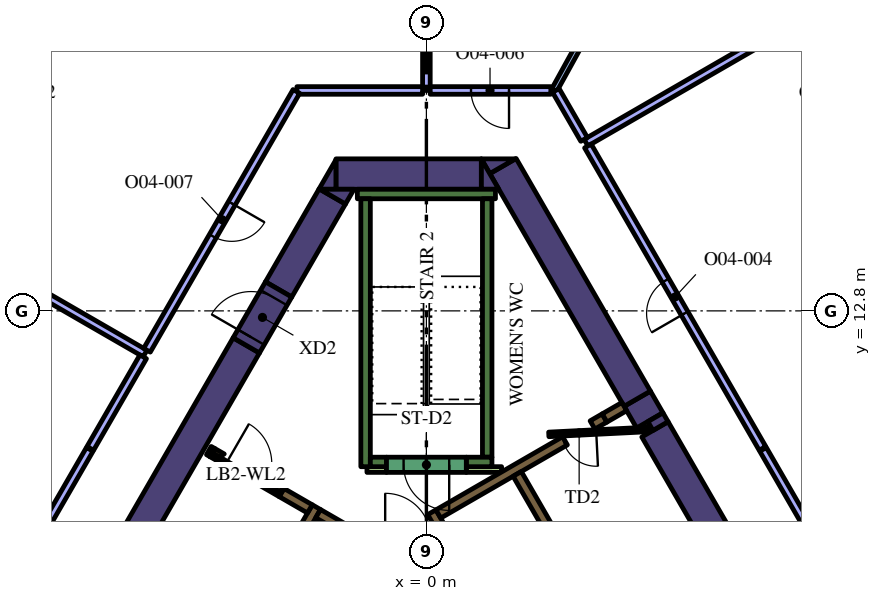
"""IFC4 building model, lengths in metres.
Left out: names, types, materials, properties, quantities, classifications, styles, units other than length and angle.
Written with IfcOpenShell. Run it as: python <this file> out.ifc"""

import sys

from ifc_helpers import new_model, si_unit, direction, frame, frame_2d, origin, place, context, subcontext, project, spatial, polyline, rectangle, outline, extrude, element, fill, save


model = new_model("IFC4")
c1 = context("Model", 3, precision=1e-05, world=origin(), true_north=direction((0.0, 1.0)))
c2 = subcontext(c1, "Body", "Model", "MODEL_VIEW")
j1 = project(units=[si_unit("LENGTHUNIT", "METRE"), si_unit("PLANEANGLEUNIT", "RADIAN")], contexts=[c1])
p1 = place(None, origin())
s1 = spatial("IfcSite", under=j1, at=p1, CompositionType="ELEMENT")
p2 = place(p1, origin())
s2 = spatial("IfcBuilding", under=s1, at=p2, CompositionType="ELEMENT")
p3 = place(p2, frame((0.0, 0.0, 183.6)))
s3 = spatial("IfcBuildingStorey", under=s2, at=p3, CompositionType="ELEMENT", Elevation=183.6)
p4 = place(p3, frame((5.878, 9.918, 0.0), z_axis=(0.0, 0.0, 1.0), x_axis=(-0.499893918903, 0.866086641072, 0.0)))
e1 = element("IfcWall", 1, at=p4, inside=s3, PredefinedType="SOLIDWALL", context=c2, shape_type="SweptSolid", body=[
    extrude(rectangle(XDim=0.657, YDim=0.8, at=frame_2d((0.329, 0.0))), origin(), (0.0, 0.0, 1.0), 4.2),
])
p5 = place(p3, frame((8.279, 5.761, 0.0), z_axis=(0.0, 0.0, 1.0), x_axis=(-0.500024261398, 0.866011396007, 0.0)))
e2 = element("IfcWall", 2, at=p5, inside=s3, PredefinedType="SOLIDWALL", context=c2, shape_type="SweptSolid", body=[
    extrude(rectangle(XDim=4.528, YDim=0.8, at=frame_2d((2.264, 0.0))), origin(), (0.0, 0.0, 1.0), 4.2),
])
p6 = place(p3, origin())
e3 = element("IfcWall", 3, at=p6, inside=s3, PredefinedType="SOLIDWALL", context=c2, shape_type="SweptSolid", body=[
    extrude(outline(polyline([(5.961, 9.654), (5.827, 9.886), (6.226, 10.116), (6.36, 9.884), (5.961, 9.654)])), origin(), (0.0, 0.0, 1.0), 4.2),
])
p7 = place(p3, frame((5.549, 10.489, 0.0), z_axis=(0.0, 0.0, 1.0), x_axis=(-0.50001746176, 0.866015321998, 0.0)))
e4 = element("IfcWall", 4, at=p7, inside=s3, PredefinedType="SOLIDWALL", context=c2, shape_type="SweptSolid", body=[
    extrude(rectangle(XDim=7.068, YDim=0.8, at=frame_2d((3.534, 0.0))), origin(), (0.0, 0.0, 1.0), 4.2),
])
e5 = element("IfcWall", 5, at=p6, inside=s3, PredefinedType="SOLIDWALL", context=c2, shape_type="SweptSolid", body=[
    extrude(outline(polyline([(1.443, 16.8), (2.339, 16.8), (1.667, 16.412), (1.443, 16.8)])), origin(), (0.0, 0.0, 1.0), 4.2),
])
p8 = place(p3, frame((-2.379, 16.4, 0.0), z_axis=(0.0, 0.0, 1.0), x_axis=(1.0, 0.0, 0.0)))
e6 = element("IfcWall", 6, at=p8, inside=s3, PredefinedType="SOLIDWALL", context=c2, shape_type="SweptSolid", body=[
    extrude(rectangle(XDim=3.824, YDim=0.8, at=frame_2d((1.912, 0.0))), origin(), (0.0, 0.0, 1.0), 4.2),
])
e7 = element("IfcWall", 7, at=p6, inside=s3, PredefinedType="SOLIDWALL", context=c2, shape_type="SweptSolid", body=[
    extrude(outline(polyline([(1.905, 16.0), (1.447, 16.0), (1.447, 16.793), (1.905, 16.0)])), origin(), (0.0, 0.0, 1.0), 4.2),
])
e8 = element("IfcWall", 8, at=p6, inside=s3, PredefinedType="SOLIDWALL", context=c2, shape_type="SweptSolid", body=[
    extrude(outline(polyline([(-2.829, 16.0), (-2.381, 16.776), (-2.381, 16.0), (-2.829, 16.0)])), origin(), (0.0, 0.0, 1.0), 4.2),
])
p9 = place(p3, frame((-2.477, 15.81, 0.0), z_axis=(0.0, 0.0, 1.0), x_axis=(-0.499969377405, -0.866043083026, 0.0)))
e9 = element("IfcWall", 9, at=p9, inside=s3, PredefinedType="SOLIDWALL", context=c2, shape_type="SweptSolid", body=[
    extrude(rectangle(XDim=2.824, YDim=0.8, at=frame_2d((1.412, 0.0))), origin(), (0.0, 0.0, 1.0), 4.2),
])
e10 = element("IfcWall", 10, at=p6, inside=s3, PredefinedType="SOLIDWALL", context=c2, shape_type="SweptSolid", body=[
    extrude(outline(polyline([(-1.905, 16.0), (-2.129, 15.612), (-2.801, 16.0), (-1.905, 16.0)])), origin(), (0.0, 0.0, 1.0), 4.2),
])
p10 = place(p3, frame((-12.668, -1.842, 0.0), z_axis=(0.0, 0.0, 1.0), x_axis=(0.500003640647, 0.866023301845, 0.0)))
e11 = element("IfcWall", 11, at=p10, inside=s3, PredefinedType="SOLIDWALL", context=c2, shape_type="SweptSolid", body=[
    extrude(rectangle(XDim=15.858, YDim=0.8, at=frame_2d((7.929, 0.0))), origin(), (0.0, 0.0, 1.0), 4.2),
])
p11 = place(p3, frame((-1.817, 15.875, 0.0), z_axis=(0.0, 0.0, 1.0), x_axis=(1.0, 0.0, 0.0)))
e12 = element("IfcWall", 12, at=p11, inside=s3, PredefinedType="SOLIDWALL", context=c2, shape_type="SweptSolid", body=[
    extrude(rectangle(XDim=3.634, YDim=0.25, at=frame_2d((1.817, 0.0))), origin(), (0.0, 0.0, 1.0), 4.2),
])
p12 = place(p3, frame((1.6, 8.95, 0.0), z_axis=(0.0, 0.0, 1.0), x_axis=(0.0, 1.0, 0.0)))
e13 = element("IfcWall", 13, at=p12, inside=s3, PredefinedType="SOLIDWALL", context=c2, shape_type="SweptSolid", body=[
    extrude(rectangle(XDim=6.8, YDim=0.25, at=frame_2d((3.4, 0.0))), origin(), (0.0, 0.0, 1.0), 4.2),
])
p13 = place(p3, frame((1.05, 8.825, 0.0), z_axis=(0.0, 0.0, 1.0), x_axis=(1.0, 0.0, 0.0)))
e14 = element("IfcWall", 14, at=p13, inside=s3, PredefinedType="SOLIDWALL", context=c2, shape_type="SweptSolid", body=[
    extrude(rectangle(XDim=0.675, YDim=0.25, at=frame_2d((0.337, 0.0))), origin(), (0.0, 0.0, 1.0), 4.2),
])
p14 = place(p3, frame((-1.6, 8.7, 0.0), z_axis=(0.0, 0.0, 1.0), x_axis=(0.0, 1.0, 0.0)))
e15 = element("IfcWall", 15, at=p14, inside=s3, PredefinedType="SOLIDWALL", context=c2, shape_type="SweptSolid", body=[
    extrude(rectangle(XDim=7.05, YDim=0.25, at=frame_2d((3.525, 0.0))), origin(), (0.0, 0.0, 1.0), 4.2),
])
p15 = place(p3, frame((-1.475, 8.825, 0.0), z_axis=(0.0, 0.0, 1.0), x_axis=(1.0, 0.0, 0.0)))
e16 = element("IfcWall", 16, at=p15, inside=s3, PredefinedType="SOLIDWALL", context=c2, shape_type="SweptSolid", body=[
    extrude(rectangle(XDim=0.425, YDim=0.25, at=frame_2d((0.212, 0.0))), origin(), (0.0, 0.0, 1.0), 4.2),
])
p16 = place(p3, frame((0.417, 7.027, 0.0), z_axis=(0.0, 0.0, 1.0), x_axis=(-0.500210807569, 0.865903659763, 0.0)))
e17 = element("IfcWall", 17, at=p16, inside=s3, PredefinedType="SOLIDWALL", context=c2, shape_type="SweptSolid", body=[
    extrude(rectangle(XDim=0.548, YDim=0.25, at=frame_2d((0.274, 0.0))), origin(), (0.0, 0.0, 1.0), 4.2),
])
p17 = place(p3, frame((3.647, 9.38, 0.0), z_axis=(0.0, 0.0, 1.0), x_axis=(-0.866025015791, -0.500000672024, 0.0)))
e18 = element("IfcWall", 18, at=p17, inside=s3, PredefinedType="SOLIDWALL", context=c2, shape_type="SweptSolid", body=[
    extrude(rectangle(XDim=3.849, YDim=0.25, at=frame_2d((1.924, 0.0))), origin(), (0.0, 0.0, 1.0), 4.2),
])
p18 = place(p3, frame((4.688, 9.981, 0.0), z_axis=(0.0, 0.0, 1.0), x_axis=(-0.865974312977, -0.500088481434, 0.0)))
e19 = element("IfcWall", 19, at=p18, inside=s3, PredefinedType="SOLIDWALL", context=c2, shape_type="SweptSolid", body=[
    extrude(rectangle(XDim=0.366, YDim=0.25, at=frame_2d((0.183, 0.0))), origin(), (0.0, 0.0, 1.0), 4.2),
])
p19 = place(p3, frame((4.689, 9.982, 0.0), z_axis=(0.0, 0.0, 1.0), x_axis=(0.865947592822, 0.500134748329, 0.0)))
e20 = element("IfcWall", 20, at=p19, inside=s3, PredefinedType="SOLIDWALL", context=c2, shape_type="SweptSolid", body=[
    extrude(rectangle(XDim=0.598, YDim=0.25, at=frame_2d((0.299, 0.0))), origin(), (0.0, 0.0, 1.0), 4.2),
])
p20 = place(p3, frame((-8.06, -1.311, 0.0), z_axis=(0.0, 0.0, 1.0), x_axis=(0.50000273126, 0.866023826885, 0.0)))
e21 = element("IfcWall", 21, at=p20, inside=s3, PredefinedType="SOLIDWALL", context=c2, shape_type="SweptSolid", body=[
    extrude(rectangle(XDim=10.33, YDim=0.25, at=frame_2d((5.165, 0.0))), origin(), (0.0, 0.0, 1.0), 4.2),
])
p21 = place(p3, frame((-1.76, 6.836, 0.0), z_axis=(0.0, 0.0, 1.0), x_axis=(-0.865952863304, 0.500125622755, 0.0)))
e22 = element("IfcWall", 22, at=p21, inside=s3, PredefinedType="SOLIDWALL", context=c2, shape_type="SweptSolid", body=[
    extrude(rectangle(XDim=1.258, YDim=0.25, at=frame_2d((0.629, 0.0))), origin(), (0.0, 0.0, 1.0), 4.2),
])
p22 = place(p3, frame((-5.725, 9.125, 0.0), z_axis=(0.0, 0.0, 1.0), x_axis=(0.866185586049, -0.49972245349, 0.0)))
e23 = element("IfcWall", 23, at=p22, inside=s3, PredefinedType="SOLIDWALL", context=c2, shape_type="SweptSolid", body=[
    extrude(rectangle(XDim=0.11, YDim=0.25, at=frame_2d((0.055, 0.0))), origin(), (0.0, 0.0, 1.0), 4.2),
])
p23 = place(p3, frame((-3.066, 7.59, 0.0), z_axis=(0.0, 0.0, 1.0), x_axis=(-0.866081358704, 0.49990307071, 0.0)))
e24 = element("IfcWall", 24, at=p23, inside=s3, PredefinedType="SOLIDWALL", context=c2, shape_type="SweptSolid", body=[
    extrude(rectangle(XDim=0.858, YDim=0.25, at=frame_2d((0.429, 0.0))), origin(), (0.0, 0.0, 1.0), 4.2),
])
e25 = element("IfcWall", 25, at=p6, inside=s3, PredefinedType="SOLIDWALL", context=c2, shape_type="SweptSolid", body=[
    extrude(outline(polyline([(-3.748, 8.128), (-3.813, 8.015), (-4.027, 8.139), (-4.017, 8.156), (-4.008, 8.173), (-4.0, 8.192), (-3.995, 8.21), (-3.991, 8.23), (-3.99, 8.25), (-3.99, 8.268), (-3.748, 8.128)])), origin(), (0.0, 0.0, 1.0), 4.2),
])
e26 = element("IfcWall", 26, at=p6, inside=s3, PredefinedType="SOLIDWALL", context=c2, shape_type="SweptSolid", body=[
    extrude(outline(polyline([(-5.689, 8.96), (-5.69, 8.961), (-5.565, 9.177), (-5.319, 9.035), (-5.335, 9.026), (-5.351, 9.015), (-5.366, 9.002), (-5.379, 8.988), (-5.392, 8.972), (-5.402, 8.956), (-5.412, 8.939), (-5.629, 9.064), (-5.629, 9.064), (-5.689, 8.96)])), origin(), (0.0, 0.0, 1.0), 4.2),
])
p24 = place(p3, frame((1.05, 8.625, 0.0), z_axis=(0.0, 0.0, 1.0), x_axis=(1.0, 0.0, 0.0)))
e27 = element("IfcWall", 27, at=p24, inside=s3, PredefinedType="PARTITIONING", context=c2, shape_type="SweptSolid", body=[
    extrude(rectangle(XDim=0.929, YDim=0.15, at=frame_2d((0.464, 0.0))), origin(), (0.0, 0.0, 1.0), 3.15),
])
p25 = place(p3, frame((-1.564, 8.625, 0.0), z_axis=(0.0, 0.0, 1.0), x_axis=(1.0, 0.0, 0.0)))
e28 = element("IfcWall", 28, at=p25, inside=s3, PredefinedType="PARTITIONING", context=c2, shape_type="SweptSolid", body=[
    extrude(rectangle(XDim=0.514, YDim=0.15, at=frame_2d((0.257, 0.0))), origin(), (0.0, 0.0, 1.0), 3.15),
])
p26 = place(p3, frame((8.565, -2.185, 0.0), z_axis=(0.0, 0.0, 1.0), x_axis=(-0.499997954832, 0.866026584559, 0.0)))
e29 = element("IfcWall", 29, at=p26, inside=s3, PredefinedType="SOLIDWALL", context=c2, shape_type="SweptSolid", body=[
    extrude(rectangle(XDim=12.35, YDim=0.25, at=frame_2d((6.175, 0.0))), origin(), (0.0, 0.0, 1.0), 4.2),
])
p27 = place(p26, frame((0.585, 0.0, 0.0)))
e30 = element("IfcOpeningElement", 30, at=p27, cuts=e29, PredefinedType="OPENING", context=c2, shape_type="SweptSolid", body=[
    extrude(rectangle(XDim=1.1, YDim=2.1, at=frame_2d((0.55, 1.05))), frame((0.0, 0.135, 0.0), z_axis=(0.0, -1.0, 0.0), x_axis=(1.0, 0.0, 0.0)), (0.0, 0.0, 1.0), 0.27),
])
p28 = place(p3, frame((1.05, 8.75, 0.0), z_axis=(0.0, 0.0, 1.0), x_axis=(-1.0, 0.0, 0.0)))
e31 = element("IfcWall", 31, at=p28, inside=s3, PredefinedType="SOLIDWALL", context=c2, shape_type="SweptSolid", body=[
    extrude(rectangle(XDim=2.1, YDim=0.4, at=frame_2d((1.05, 0.0))), origin(), (0.0, 0.0, 1.0), 4.2),
])
p29 = place(p28, frame((0.45, 0.0, 0.0)))
e32 = element("IfcOpeningElement", 32, at=p29, cuts=e31, PredefinedType="OPENING", context=c2, shape_type="SweptSolid", body=[
    extrude(rectangle(XDim=1.2, YDim=2.1, at=frame_2d((0.6, 1.05))), frame((0.0, 0.21, 0.0), z_axis=(0.0, -1.0, 0.0), x_axis=(1.0, 0.0, 0.0)), (0.0, 0.0, 1.0), 0.42),
])
p30 = place(p3, frame((5.917, 9.684, 0.0), z_axis=(0.0, 0.0, 1.0), x_axis=(-0.998758194515, -0.049820366212, 0.0)))
e33 = element("IfcWall", 33, at=p30, inside=s3, PredefinedType="PARTITIONING", context=c2, shape_type="SweptSolid", body=[
    extrude(rectangle(XDim=2.7, YDim=0.12, at=frame_2d((1.35, 0.0))), origin(), (0.0, 0.0, 1.0), 3.15),
])
p31 = place(p30, frame((1.45, 0.0, 0.0)))
e34 = element("IfcOpeningElement", 34, at=p31, cuts=e33, PredefinedType="OPENING", context=c2, shape_type="SweptSolid", body=[
    extrude(rectangle(XDim=0.9, YDim=2.1, at=frame_2d((0.45, 1.05))), frame((0.0, 0.07, 0.0), z_axis=(0.0, -1.0, 0.0), x_axis=(1.0, 0.0, 0.0)), (0.0, 0.0, 1.0), 0.14),
])
p32 = place(p3, frame((-5.659, 9.012, 0.0), z_axis=(0.0, 0.0, 1.0), x_axis=(0.866009402589, -0.500027713859, 0.0)))
e35 = element("IfcWall", 35, at=p32, inside=s3, PredefinedType="PARTITIONING", context=c2, shape_type="SweptSolid", body=[
    extrude(rectangle(XDim=2.1, YDim=0.12, at=frame_2d((1.05, 0.0))), origin(), (0.0, 0.0, 1.0), 3.15),
])
p33 = place(p32, frame((0.45, 0.0, 0.0)))
e36 = element("IfcOpeningElement", 36, at=p33, cuts=e35, PredefinedType="OPENING", context=c2, shape_type="SweptSolid", body=[
    extrude(rectangle(XDim=1.2, YDim=2.1, at=frame_2d((0.6, 1.05))), frame((0.0, 0.07, 0.0), z_axis=(0.0, -1.0, 0.0), x_axis=(1.0, 0.0, 0.0)), (0.0, 0.0, 1.0), 0.14),
])
p34 = place(p3, frame((-4.739, 11.892, 0.0), z_axis=(0.0, 0.0, 1.0), x_axis=(0.500062241894, 0.865989465428, 0.0)))
e37 = element("IfcWall", 37, at=p34, inside=s3, PredefinedType="SOLIDWALL", context=c2, shape_type="SweptSolid", body=[
    extrude(rectangle(XDim=1.7, YDim=0.8, at=frame_2d((0.85, 0.0))), origin(), (0.0, 0.0, 1.0), 4.2),
])
p35 = place(p34, frame((0.25, 0.0, 0.0)))
e38 = element("IfcOpeningElement", 38, at=p35, cuts=e37, PredefinedType="OPENING", context=c2, shape_type="SweptSolid", body=[
    extrude(rectangle(XDim=1.2, YDim=2.1, at=frame_2d((0.6, 1.05))), frame((0.0, 0.41, 0.0), z_axis=(0.0, -1.0, 0.0), x_axis=(1.0, 0.0, 0.0)), (0.0, 0.0, 1.0), 0.82),
])
p36 = place(p3, frame((4.2, 17.226, 0.0), z_axis=(0.0, 0.0, 1.0), x_axis=(0.866021486214, 0.500006785369, 0.0)))
e39 = element("IfcWall", 39, at=p36, inside=s3, PredefinedType="PARTITIONING", context=c2, shape_type="SweptSolid", body=[
    extrude(rectangle(XDim=8.126, YDim=0.2, at=frame_2d((4.063, 0.0))), origin(), (0.0, 0.0, 1.0), 3.15),
])
p37 = place(p3, frame((12.359, 3.094, 0.0), z_axis=(0.0, 0.0, 1.0), x_axis=(-0.500010275428, 0.866019471182, 0.0)))
e40 = element("IfcWall", 40, at=p37, inside=s3, PredefinedType="PARTITIONING", context=c2, shape_type="SweptSolid", body=[
    extrude(rectangle(XDim=7.0, YDim=0.2, at=frame_2d((3.5, 0.0))), origin(), (0.0, 0.0, 1.0), 3.15),
])
p38 = place(p3, frame((8.844, 9.182, 0.0), z_axis=(0.0, 0.0, 1.0), x_axis=(-0.50000000053, 0.866025403479, 0.0)))
e41 = element("IfcWall", 41, at=p38, inside=s3, PredefinedType="PARTITIONING", context=c2, shape_type="SweptSolid", body=[
    extrude(rectangle(XDim=9.188, YDim=0.2, at=frame_2d((4.594, 0.0))), origin(), (0.0, 0.0, 1.0), 3.15),
])
p39 = place(p38, frame((4.1, 0.0, 0.0)))
e42 = element("IfcOpeningElement", 42, at=p39, cuts=e41, PredefinedType="OPENING", context=c2, shape_type="SweptSolid", body=[
    extrude(rectangle(XDim=1.0, YDim=2.1, at=frame_2d((0.5, 1.05))), frame((0.0, 0.11, 0.0), z_axis=(0.0, -1.0, 0.0), x_axis=(1.0, 0.0, 0.0)), (0.0, 0.0, 1.0), 0.22),
])
p40 = place(p3, frame((7.698, 26.465, 0.0), z_axis=(0.0, 0.0, 1.0), x_axis=(-0.482998301798, -0.875621288263, 0.0)))
e43 = element("IfcWall", 43, at=p40, inside=s3, PredefinedType="PARTITIONING", context=c2, shape_type="SweptSolid", body=[
    extrude(rectangle(XDim=8.982, YDim=0.15, at=frame_2d((4.491, 0.0))), origin(), (0.0, 0.0, 1.0), 3.15),
])
p41 = place(p40, frame((4.083, 0.0, 0.0)))
e44 = element("IfcOpeningElement", 44, at=p41, cuts=e43, PredefinedType="OPENING", context=c2, shape_type="SweptSolid", body=[
    extrude(rectangle(XDim=0.9, YDim=2.1, at=frame_2d((0.45, 1.05))), frame((0.0, 0.085, 0.0), z_axis=(0.0, -1.0, 0.0), x_axis=(1.0, 0.0, 0.0)), (0.0, 0.0, 1.0), 0.17),
])
p42 = place(p3, frame((4.15, 17.312, 0.0), z_axis=(0.0, 0.0, 1.0), x_axis=(-0.499935638681, 0.86606255962, 0.0)))
e45 = element("IfcWall", 45, at=p42, inside=s3, PredefinedType="PARTITIONING", context=c2, shape_type="SweptSolid", body=[
    extrude(rectangle(XDim=1.487, YDim=0.2, at=frame_2d((0.744, 0.0))), origin(), (0.0, 0.0, 1.0), 3.15),
])
p43 = place(p3, frame((0.0, 18.6, 0.0), z_axis=(0.0, 0.0, 1.0), x_axis=(0.0, 1.0, 0.0)))
e46 = element("IfcWall", 46, at=p43, inside=s3, PredefinedType="PARTITIONING", context=c2, shape_type="SweptSolid", body=[
    extrude(rectangle(XDim=10.754, YDim=0.2, at=frame_2d((5.377, 0.0))), origin(), (0.0, 0.0, 1.0), 3.15),
])
p44 = place(p3, frame((3.274, 18.6, 0.0), z_axis=(0.0, 0.0, 1.0), x_axis=(-1.0, 0.0, 0.0)))
e47 = element("IfcWall", 47, at=p44, inside=s3, PredefinedType="PARTITIONING", context=c2, shape_type="SweptSolid", body=[
    extrude(rectangle(XDim=3.174, YDim=0.2, at=frame_2d((1.587, 0.0))), origin(), (0.0, 0.0, 1.0), 3.15),
])
p45 = place(p44, frame((1.1, 0.0, 0.0)))
e48 = element("IfcOpeningElement", 48, at=p45, cuts=e47, PredefinedType="OPENING", context=c2, shape_type="SweptSolid", body=[
    extrude(rectangle(XDim=1.0, YDim=2.1, at=frame_2d((0.5, 1.05))), frame((0.0, 0.11, 0.0), z_axis=(0.0, -1.0, 0.0), x_axis=(1.0, 0.0, 0.0)), (0.0, 0.0, 1.0), 0.22),
])
p46 = place(p3, frame((-7.403, 11.678, 0.0), z_axis=(0.0, 0.0, 1.0), x_axis=(-0.866029143232, 0.499993523031, 0.0)))
e49 = element("IfcWall", 49, at=p46, inside=s3, PredefinedType="PARTITIONING", context=c2, shape_type="SweptSolid", body=[
    extrude(rectangle(XDim=8.42, YDim=0.2, at=frame_2d((4.21, 0.0))), origin(), (0.0, 0.0, 1.0), 3.15),
])
p47 = place(p3, frame((-0.1, 18.6, 0.0), z_axis=(0.0, 0.0, 1.0), x_axis=(-1.0, 0.0, 0.0)))
e50 = element("IfcWall", 50, at=p47, inside=s3, PredefinedType="PARTITIONING", context=c2, shape_type="SweptSolid", body=[
    extrude(rectangle(XDim=3.306, YDim=0.2, at=frame_2d((1.653, 0.0))), origin(), (0.0, 0.0, 1.0), 3.15),
])
p48 = place(p3, frame((-3.421, 18.574, 0.0), z_axis=(0.0, 0.0, 1.0), x_axis=(-0.499989434416, -0.866031503741, 0.0)))
e51 = element("IfcWall", 51, at=p48, inside=s3, PredefinedType="PARTITIONING", context=c2, shape_type="SweptSolid", body=[
    extrude(rectangle(XDim=7.863, YDim=0.2, at=frame_2d((3.932, 0.0))), origin(), (0.0, 0.0, 1.0), 3.15),
])
p49 = place(p48, frame((3.4, 0.0, 0.0)))
e52 = element("IfcOpeningElement", 52, at=p49, cuts=e51, PredefinedType="OPENING", context=c2, shape_type="SweptSolid", body=[
    extrude(rectangle(XDim=1.0, YDim=2.1, at=frame_2d((0.5, 1.05))), frame((0.0, 0.11, 0.0), z_axis=(0.0, -1.0, 0.0), x_axis=(1.0, 0.0, 0.0)), (0.0, 0.0, 1.0), 0.22),
])
p50 = place(p3, frame((-8.859, 9.156, 0.0), z_axis=(0.0, 0.0, 1.0), x_axis=(-0.500010275428, -0.866019471182, 0.0)))
e53 = element("IfcWall", 53, at=p50, inside=s3, PredefinedType="PARTITIONING", context=c2, shape_type="SweptSolid", body=[
    extrude(rectangle(XDim=7.0, YDim=0.2, at=frame_2d((3.5, 0.0))), origin(), (0.0, 0.0, 1.0), 3.15),
])
p51 = place(p3, frame((-7.453, 11.591, 0.0), z_axis=(0.0, 0.0, 1.0), x_axis=(-0.499980749935, -0.866036517529, 0.0)))
e54 = element("IfcWall", 54, at=p51, inside=s3, PredefinedType="PARTITIONING", context=c2, shape_type="SweptSolid", body=[
    extrude(rectangle(XDim=2.782, YDim=0.2, at=frame_2d((1.391, 0.0))), origin(), (0.0, 0.0, 1.0), 3.15),
])
p52 = place(p3, frame((12.783, 19.171, 0.0), z_axis=(0.0, 0.0, 1.0), x_axis=(-0.551892811511, 0.833915058386, 0.0)))
e55 = element("IfcWall", 55, at=p52, inside=s3, PredefinedType="SOLIDWALL", context=c2, shape_type="SweptSolid", body=[
    extrude(rectangle(XDim=5.204, YDim=0.24, at=frame_2d((2.602, 0.0))), origin(), (0.0, 0.0, 1.0), 3.95),
])
p53 = place(p52, frame((0.248, 0.0, 0.9)))
e56 = element("IfcOpeningElement", 56, at=p53, cuts=e55, PredefinedType="OPENING", context=c2, shape_type="SweptSolid", body=[
    extrude(rectangle(XDim=1.5, YDim=2.55, at=frame_2d((0.75, 1.275))), frame((0.0, 0.13, 0.0), z_axis=(0.0, -1.0, 0.0), x_axis=(1.0, 0.0, 0.0)), (0.0, 0.0, 1.0), 0.26),
])
p54 = place(p52, frame((3.455, 0.0, 0.9)))
e57 = element("IfcOpeningElement", 57, at=p54, cuts=e55, PredefinedType="OPENING", context=c2, shape_type="SweptSolid", body=[
    extrude(rectangle(XDim=1.5, YDim=2.55, at=frame_2d((0.75, 1.275))), frame((0.0, 0.13, 0.0), z_axis=(0.0, -1.0, 0.0), x_axis=(1.0, 0.0, 0.0)), (0.0, 0.0, 1.0), 0.26),
])
p55 = place(p3, frame((-9.911, 23.51, 0.0), z_axis=(0.0, 0.0, 1.0), x_axis=(-0.551892811511, -0.833915058386, 0.0)))
e58 = element("IfcWall", 58, at=p55, inside=s3, PredefinedType="SOLIDWALL", context=c2, shape_type="SweptSolid", body=[
    extrude(rectangle(XDim=5.204, YDim=0.24, at=frame_2d((2.602, 0.0))), origin(), (0.0, 0.0, 1.0), 3.95),
])
p56 = place(p55, frame((0.248, 0.0, 0.9)))
e59 = element("IfcOpeningElement", 59, at=p56, cuts=e58, PredefinedType="OPENING", context=c2, shape_type="SweptSolid", body=[
    extrude(rectangle(XDim=1.5, YDim=2.55, at=frame_2d((0.75, 1.275))), frame((0.0, 0.13, 0.0), z_axis=(0.0, -1.0, 0.0), x_axis=(1.0, 0.0, 0.0)), (0.0, 0.0, 1.0), 0.26),
])
p57 = place(p55, frame((3.455, 0.0, 0.9)))
e60 = element("IfcOpeningElement", 60, at=p57, cuts=e58, PredefinedType="OPENING", context=c2, shape_type="SweptSolid", body=[
    extrude(rectangle(XDim=1.5, YDim=2.55, at=frame_2d((0.75, 1.275))), frame((0.0, 0.13, 0.0), z_axis=(0.0, -1.0, 0.0), x_axis=(1.0, 0.0, 0.0)), (0.0, 0.0, 1.0), 0.26),
])
p58 = place(p29, origin())
e61 = element("IfcDoor", 61, at=p58, inside=s3, OperationType="SINGLE_SWING_LEFT", PredefinedType="DOOR", context=c2, shape_type="SweptSolid", body=[
    extrude(rectangle(XDim=1.2, YDim=2.1, at=frame_2d((0.6, 1.05))), frame((0.0, 0.025, 0.0), z_axis=(0.0, -1.0, 0.0), x_axis=(1.0, 0.0, 0.0)), (0.0, 0.0, 1.0), 0.05),
])
fill(e32, e61)
p59 = place(p31, origin())
e62 = element("IfcDoor", 62, at=p59, inside=s3, OperationType="SINGLE_SWING_LEFT", PredefinedType="DOOR", context=c2, shape_type="SweptSolid", body=[
    extrude(rectangle(XDim=0.9, YDim=2.1, at=frame_2d((0.45, 1.05))), frame((0.0, 0.025, 0.0), z_axis=(0.0, -1.0, 0.0), x_axis=(1.0, 0.0, 0.0)), (0.0, 0.0, 1.0), 0.05),
])
fill(e34, e62)
p60 = place(p33, origin())
e63 = element("IfcDoor", 63, at=p60, inside=s3, OperationType="SINGLE_SWING_LEFT", PredefinedType="DOOR", context=c2, shape_type="SweptSolid", body=[
    extrude(rectangle(XDim=1.2, YDim=2.1, at=frame_2d((0.6, 1.05))), frame((0.0, 0.025, 0.0), z_axis=(0.0, -1.0, 0.0), x_axis=(1.0, 0.0, 0.0)), (0.0, 0.0, 1.0), 0.05),
])
fill(e36, e63)
p61 = place(p35, origin())
e64 = element("IfcDoor", 64, at=p61, inside=s3, OperationType="SINGLE_SWING_LEFT", PredefinedType="DOOR", context=c2, shape_type="SweptSolid", body=[
    extrude(rectangle(XDim=1.2, YDim=2.1, at=frame_2d((0.6, 1.05))), frame((0.0, 0.025, 0.0), z_axis=(0.0, -1.0, 0.0), x_axis=(1.0, 0.0, 0.0)), (0.0, 0.0, 1.0), 0.05),
])
fill(e38, e64)
p62 = place(p39, origin())
e65 = element("IfcDoor", 65, at=p62, inside=s3, OperationType="SINGLE_SWING_RIGHT", PredefinedType="DOOR", context=c2, shape_type="SweptSolid", body=[
    extrude(rectangle(XDim=1.0, YDim=2.1, at=frame_2d((0.5, 1.05))), frame((0.0, 0.025, 0.0), z_axis=(0.0, -1.0, 0.0), x_axis=(1.0, 0.0, 0.0)), (0.0, 0.0, 1.0), 0.05),
])
fill(e42, e65)
p63 = place(p45, origin())
e66 = element("IfcDoor", 66, at=p63, inside=s3, OperationType="SINGLE_SWING_RIGHT", PredefinedType="DOOR", context=c2, shape_type="SweptSolid", body=[
    extrude(rectangle(XDim=1.0, YDim=2.1, at=frame_2d((0.5, 1.05))), frame((0.0, 0.025, 0.0), z_axis=(0.0, -1.0, 0.0), x_axis=(1.0, 0.0, 0.0)), (0.0, 0.0, 1.0), 0.05),
])
fill(e48, e66)
p64 = place(p49, origin())
e67 = element("IfcDoor", 67, at=p64, inside=s3, OperationType="SINGLE_SWING_LEFT", PredefinedType="DOOR", context=c2, shape_type="SweptSolid", body=[
    extrude(rectangle(XDim=1.0, YDim=2.1, at=frame_2d((0.5, 1.05))), frame((0.0, 0.025, 0.0), z_axis=(0.0, -1.0, 0.0), x_axis=(1.0, 0.0, 0.0)), (0.0, 0.0, 1.0), 0.05),
])
fill(e52, e67)
save(model, sys.argv[1])
